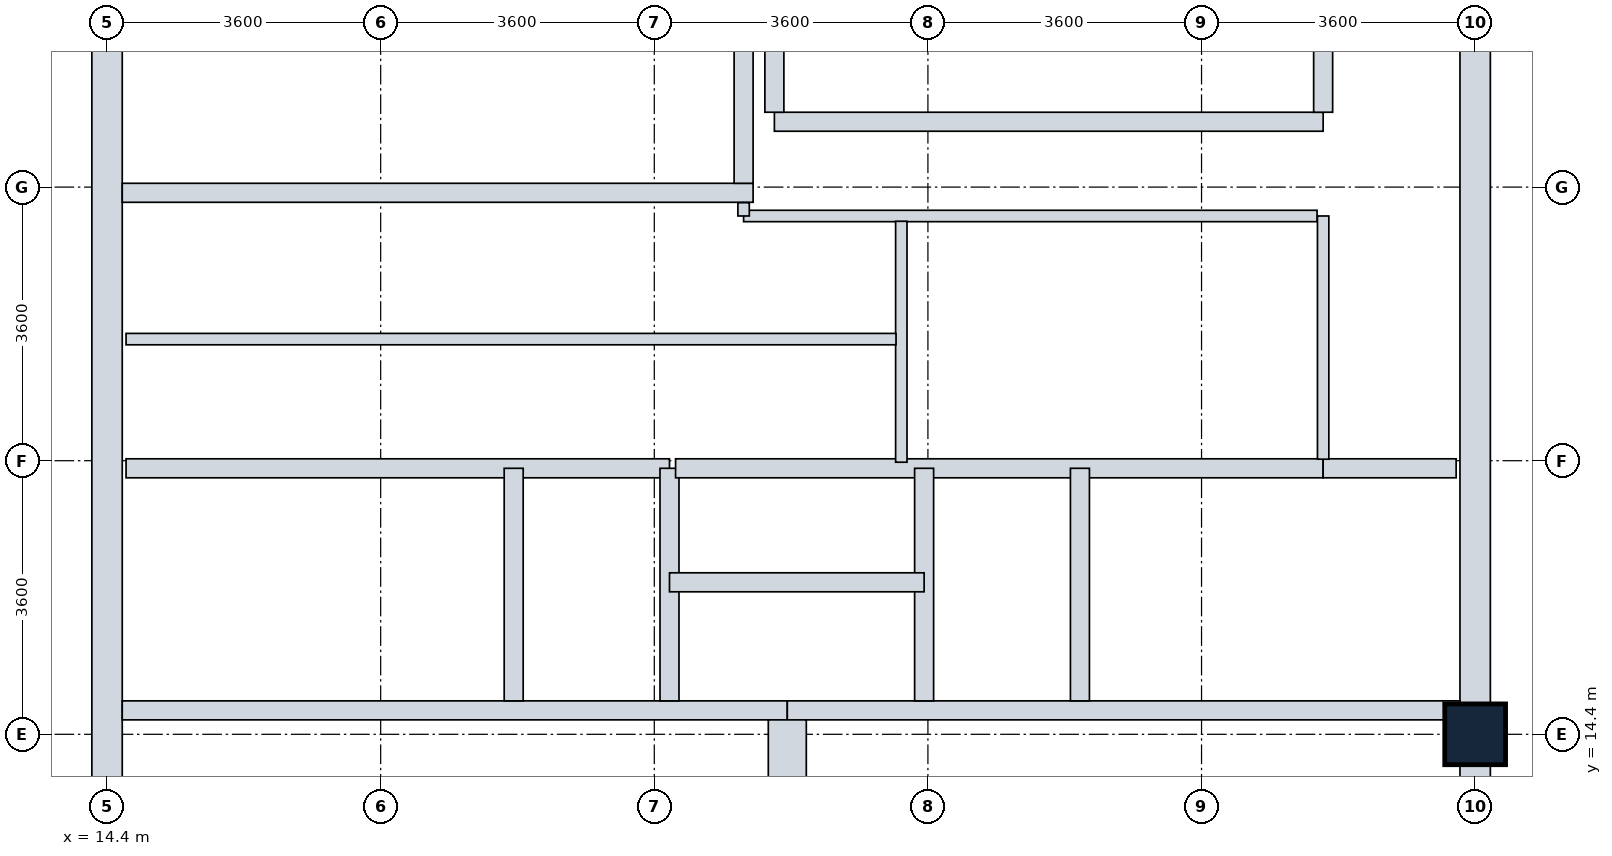
"""IFC4 building model, lengths in metres.
Left out: names, types, materials, properties, quantities, classifications, styles, units other than length and angle.
Written with IfcOpenShell. Run it as: python <this file> out.ifc"""

import sys

from ifc_helpers import new_model, si_unit, direction, frame, frame_2d, origin, origin_2d, place, context, subcontext, project, spatial, rectangle, extrude, element, fill, save


model = new_model("IFC4")
c1 = context("Model", 3, precision=1e-05, world=origin(), true_north=direction((0.0, 1.0)))
c2 = subcontext(c1, "Body", "Model", "MODEL_VIEW")
j1 = project(units=[si_unit("LENGTHUNIT", "METRE"), si_unit("PLANEANGLEUNIT", "RADIAN")], contexts=[c1])
p1 = place(None, origin())
s1 = spatial("IfcSite", under=j1, at=p1, CompositionType="ELEMENT")
p2 = place(p1, origin())
s2 = spatial("IfcBuilding", under=s1, at=p2, CompositionType="ELEMENT")
p3 = place(p2, frame((0.0, 0.0, 249.8)))
s3 = spatial("IfcBuildingStorey", under=s2, at=p3, CompositionType="ELEMENT", Elevation=249.8)
p4 = place(p3, frame((32.4, 14.4, 0.0), z_axis=(0.0, 0.0, 1.0), x_axis=(1.0, 0.0, 0.0)))
e1 = element("IfcColumn", 1, at=p4, inside=s3, PredefinedType="COLUMN", context=c2, shape_type="SweptSolid", body=[
    extrude(rectangle(XDim=0.8, YDim=0.8, at=origin_2d()), origin(), (0.0, 0.0, 1.0), 6.0),
])
p5 = place(p3, frame((14.4, 10.8, 0.0), z_axis=(0.0, 0.0, 1.0), x_axis=(0.0, 1.0, 0.0)))
e2 = element("IfcWall", 2, at=p5, inside=s3, PredefinedType="SHEAR", context=c2, shape_type="SweptSolid", body=[
    extrude(rectangle(XDim=14.4, YDim=0.4, at=frame_2d((7.2, 0.0))), origin(), (0.0, 0.0, 1.0), 5.75),
])
p6 = place(p5, frame((11.05, 0.0, 0.0)))
e3 = element("IfcOpeningElement", 3, at=p6, cuts=e2, PredefinedType="OPENING", context=c2, shape_type="SweptSolid", body=[
    extrude(rectangle(XDim=1.1, YDim=2.1, at=frame_2d((0.55, 1.05))), frame((0.0, 0.21, 0.0), z_axis=(0.0, -1.0, 0.0), x_axis=(1.0, 0.0, 0.0)), (0.0, 0.0, 1.0), 0.42),
])
p7 = place(p5, frame((4.9, 0.0, 0.0)))
e4 = element("IfcOpeningElement", 4, at=p7, cuts=e2, PredefinedType="OPENING", context=c2, shape_type="SweptSolid", body=[
    extrude(rectangle(XDim=1.2, YDim=2.1, at=frame_2d((0.6, 1.05))), frame((0.0, 0.21, 0.0), z_axis=(0.0, -1.0, 0.0), x_axis=(1.0, 0.0, 0.0)), (0.0, 0.0, 1.0), 0.42),
])
p8 = place(p5, frame((7.5, 0.0, 0.0)))
e5 = element("IfcOpeningElement", 5, at=p8, cuts=e2, PredefinedType="OPENING", context=c2, shape_type="SweptSolid", body=[
    extrude(rectangle(XDim=0.85, YDim=2.1, at=frame_2d((0.425, 1.05))), frame((0.0, 0.21, 0.0), z_axis=(0.0, -1.0, 0.0), x_axis=(1.0, 0.0, 0.0)), (0.0, 0.0, 1.0), 0.42),
])
p9 = place(p3, frame((32.4, 10.8, 0.0), z_axis=(0.0, 0.0, 1.0), x_axis=(0.0, 1.0, 0.0)))
e6 = element("IfcWall", 6, at=p9, inside=s3, PredefinedType="SHEAR", context=c2, shape_type="SweptSolid", body=[
    extrude(rectangle(XDim=14.4, YDim=0.4, at=frame_2d((7.2, 0.0))), origin(), (0.0, 0.0, 1.0), 5.75),
])
p10 = place(p9, frame((4.35, 0.0, 0.0)))
e7 = element("IfcOpeningElement", 7, at=p10, cuts=e6, PredefinedType="OPENING", context=c2, shape_type="SweptSolid", body=[
    extrude(rectangle(XDim=1.2, YDim=2.1, at=frame_2d((0.6, 1.05))), frame((0.0, 0.21, 0.0), z_axis=(0.0, -1.0, 0.0), x_axis=(1.0, 0.0, 0.0)), (0.0, 0.0, 1.0), 0.42),
])
p11 = place(p9, frame((10.0, 0.0, 0.0)))
e8 = element("IfcOpeningElement", 8, at=p11, cuts=e6, PredefinedType="OPENING", context=c2, shape_type="SweptSolid", body=[
    extrude(rectangle(XDim=1.2, YDim=2.1, at=frame_2d((0.6, 1.05))), frame((0.0, 0.21, 0.0), z_axis=(0.0, -1.0, 0.0), x_axis=(1.0, 0.0, 0.0)), (0.0, 0.0, 1.0), 0.42),
])
p12 = place(p3, frame((14.6, 14.715, 0.0), z_axis=(0.0, 0.0, 1.0), x_axis=(1.0, 0.0, 0.0)))
e9 = element("IfcWall", 9, at=p12, inside=s3, PredefinedType="SHEAR", context=c2, shape_type="SweptSolid", body=[
    extrude(rectangle(XDim=8.75, YDim=0.25, at=frame_2d((4.375, 0.0))), origin(), (0.0, 0.0, 1.0), 5.75),
])
p13 = place(p12, frame((0.755, 0.0, 0.0)))
e10 = element("IfcOpeningElement", 10, at=p13, cuts=e9, PredefinedType="OPENING", context=c2, shape_type="SweptSolid", body=[
    extrude(rectangle(XDim=1.1, YDim=2.1, at=frame_2d((0.55, 1.05))), frame((0.0, 0.135, 0.0), z_axis=(0.0, -1.0, 0.0), x_axis=(1.0, 0.0, 0.0)), (0.0, 0.0, 1.0), 0.27),
])
p14 = place(p3, frame((23.35, 14.715, 0.0), z_axis=(0.0, 0.0, 1.0), x_axis=(1.0, 0.0, 0.0)))
e11 = element("IfcWall", 11, at=p14, inside=s3, PredefinedType="SHEAR", context=c2, shape_type="SweptSolid", body=[
    extrude(rectangle(XDim=8.85, YDim=0.25, at=frame_2d((4.425, 0.0))), origin(), (0.0, 0.0, 1.0), 5.75),
])
p15 = place(p14, frame((6.775, 0.0, 0.0)))
e12 = element("IfcOpeningElement", 12, at=p15, cuts=e11, PredefinedType="OPENING", context=c2, shape_type="SweptSolid", body=[
    extrude(rectangle(XDim=1.1, YDim=2.1, at=frame_2d((0.55, 1.05))), frame((0.0, 0.135, 0.0), z_axis=(0.0, -1.0, 0.0), x_axis=(1.0, 0.0, 0.0)), (0.0, 0.0, 1.0), 0.27),
])
p16 = place(p3, frame((23.35, 11.75, 0.0), z_axis=(0.0, 0.0, 1.0), x_axis=(0.0, 1.0, 0.0)))
e13 = element("IfcWall", 13, at=p16, inside=s3, PredefinedType="SHEAR", context=c2, shape_type="SweptSolid", body=[
    extrude(rectangle(XDim=2.84, YDim=0.5, at=frame_2d((1.42, 0.0))), origin(), (0.0, 0.0, 1.0), 5.75),
])
p17 = place(p3, frame((14.6, 21.525, 0.0), z_axis=(0.0, 0.0, 1.0), x_axis=(1.0, 0.0, 0.0)))
e14 = element("IfcWall", 14, at=p17, inside=s3, PredefinedType="SHEAR", context=c2, shape_type="SweptSolid", body=[
    extrude(rectangle(XDim=8.3, YDim=0.25, at=frame_2d((4.15, 0.0))), origin(), (0.0, 0.0, 1.0), 5.75),
])
p18 = place(p3, frame((22.775, 21.65, 0.0), z_axis=(0.0, 0.0, 1.0), x_axis=(0.0, 1.0, 0.0)))
e15 = element("IfcWall", 15, at=p18, inside=s3, PredefinedType="SHEAR", context=c2, shape_type="SweptSolid", body=[
    extrude(rectangle(XDim=2.84, YDim=0.25, at=frame_2d((1.42, 0.0))), origin(), (0.0, 0.0, 1.0), 5.75),
])
p19 = place(p3, frame((14.65, 17.9, 0.0), z_axis=(0.0, 0.0, 1.0), x_axis=(1.0, 0.0, 0.0)))
e16 = element("IfcWall", 16, at=p19, inside=s3, PredefinedType="PARTITIONING", context=c2, shape_type="SweptSolid", body=[
    extrude(rectangle(XDim=7.15, YDim=0.25, at=frame_2d((3.575, 0.0))), origin(), (0.0, 0.0, 1.0), 5.735),
])
p20 = place(p3, frame((19.75, 14.84, 0.0), z_axis=(0.0, 0.0, 1.0), x_axis=(0.0, 1.0, 0.0)))
e17 = element("IfcWall", 17, at=p20, inside=s3, PredefinedType="PARTITIONING", context=c2, shape_type="SweptSolid", body=[
    extrude(rectangle(XDim=3.06, YDim=0.25, at=frame_2d((1.53, 0.0))), origin(), (0.0, 0.0, 1.0), 5.735),
])
p21 = place(p20, frame((0.98, 0.0, 0.0)))
e18 = element("IfcOpeningElement", 18, at=p21, cuts=e17, PredefinedType="OPENING", context=c2, shape_type="SweptSolid", body=[
    extrude(rectangle(XDim=1.1, YDim=2.1, at=frame_2d((0.55, 1.05))), frame((0.0, 0.135, 0.0), z_axis=(0.0, -1.0, 0.0), x_axis=(1.0, 0.0, 0.0)), (0.0, 0.0, 1.0), 0.27),
])
p22 = place(p3, frame((21.8, 14.84, 0.0), z_axis=(0.0, 0.0, 1.0), x_axis=(0.0, 1.0, 0.0)))
e19 = element("IfcWall", 19, at=p22, inside=s3, PredefinedType="PARTITIONING", context=c2, shape_type="SweptSolid", body=[
    extrude(rectangle(XDim=3.06, YDim=0.25, at=frame_2d((1.53, 0.0))), origin(), (0.0, 0.0, 1.0), 5.735),
])
p23 = place(p3, frame((21.88, 17.9, 0.0), z_axis=(0.0, 0.0, 1.0), x_axis=(1.0, 0.0, 0.0)))
e20 = element("IfcWall", 20, at=p23, inside=s3, PredefinedType="PARTITIONING", context=c2, shape_type="SweptSolid", body=[
    extrude(rectangle(XDim=8.52, YDim=0.25, at=frame_2d((4.26, 0.0))), origin(), (0.0, 0.0, 1.0), 5.735),
])
p24 = place(p3, frame((30.4, 17.9, 0.0), z_axis=(0.0, 0.0, 1.0), x_axis=(1.0, 0.0, 0.0)))
e21 = element("IfcWall", 21, at=p24, inside=s3, PredefinedType="PARTITIONING", context=c2, shape_type="SweptSolid", body=[
    extrude(rectangle(XDim=1.75, YDim=0.25, at=frame_2d((0.875, 0.0))), origin(), (0.0, 0.0, 1.0), 5.735),
])
p25 = place(p24, frame((0.32, 0.0, 0.0)))
e22 = element("IfcOpeningElement", 22, at=p25, cuts=e21, PredefinedType="OPENING", context=c2, shape_type="SweptSolid", body=[
    extrude(rectangle(XDim=1.1, YDim=2.1, at=frame_2d((0.55, 1.05))), frame((0.0, 0.135, 0.0), z_axis=(0.0, -1.0, 0.0), x_axis=(1.0, 0.0, 0.0)), (0.0, 0.0, 1.0), 0.27),
])
p26 = place(p3, frame((25.15, 14.84, 0.0), z_axis=(0.0, 0.0, 1.0), x_axis=(0.0, 1.0, 0.0)))
e23 = element("IfcWall", 23, at=p26, inside=s3, PredefinedType="PARTITIONING", context=c2, shape_type="SweptSolid", body=[
    extrude(rectangle(XDim=3.06, YDim=0.25, at=frame_2d((1.53, 0.0))), origin(), (0.0, 0.0, 1.0), 5.735),
])
p27 = place(p3, frame((27.2, 14.84, 0.0), z_axis=(0.0, 0.0, 1.0), x_axis=(0.0, 1.0, 0.0)))
e24 = element("IfcWall", 24, at=p27, inside=s3, PredefinedType="PARTITIONING", context=c2, shape_type="SweptSolid", body=[
    extrude(rectangle(XDim=3.06, YDim=0.25, at=frame_2d((1.53, 0.0))), origin(), (0.0, 0.0, 1.0), 5.735),
])
p28 = place(p27, frame((0.98, 0.0, 0.0)))
e25 = element("IfcOpeningElement", 25, at=p28, cuts=e24, PredefinedType="OPENING", context=c2, shape_type="SweptSolid", body=[
    extrude(rectangle(XDim=1.1, YDim=2.1, at=frame_2d((0.55, 1.05))), frame((0.0, 0.135, 0.0), z_axis=(0.0, -1.0, 0.0), x_axis=(1.0, 0.0, 0.0)), (0.0, 0.0, 1.0), 0.27),
])
p29 = place(p3, frame((21.8, 16.4, 0.0), z_axis=(0.0, 0.0, 1.0), x_axis=(1.0, 0.0, 0.0)))
e26 = element("IfcWall", 26, at=p29, inside=s3, PredefinedType="PARTITIONING", context=c2, shape_type="SweptSolid", body=[
    extrude(rectangle(XDim=3.35, YDim=0.25, at=frame_2d((1.675, 0.0))), origin(), (0.0, 0.0, 1.0), 5.735),
])
p30 = place(p3, frame((23.18, 22.46, 0.0), z_axis=(0.0, 0.0, 1.0), x_axis=(1.0, 0.0, 0.0)))
e27 = element("IfcWall", 27, at=p30, inside=s3, PredefinedType="PARTITIONING", context=c2, shape_type="SweptSolid", body=[
    extrude(rectangle(XDim=7.22, YDim=0.25, at=frame_2d((3.61, 0.0))), origin(), (0.0, 0.0, 1.0), 5.735),
])
p31 = place(p30, frame((0.41, 0.0, 0.0)))
e28 = element("IfcOpeningElement", 28, at=p31, cuts=e27, PredefinedType="OPENING", context=c2, shape_type="SweptSolid", body=[
    extrude(rectangle(XDim=1.1, YDim=2.1, at=frame_2d((0.55, 1.05))), frame((0.0, 0.135, 0.0), z_axis=(0.0, -1.0, 0.0), x_axis=(1.0, 0.0, 0.0)), (0.0, 0.0, 1.0), 0.27),
])
p32 = place(p30, frame((2.19, 0.0, 0.0)))
e29 = element("IfcOpeningElement", 29, at=p32, cuts=e27, PredefinedType="OPENING", context=c2, shape_type="SweptSolid", body=[
    extrude(rectangle(XDim=1.1, YDim=2.1, at=frame_2d((0.55, 1.05))), frame((0.0, 0.135, 0.0), z_axis=(0.0, -1.0, 0.0), x_axis=(1.0, 0.0, 0.0)), (0.0, 0.0, 1.0), 0.27),
])
p33 = place(p30, frame((3.97, 0.0, 0.0)))
e30 = element("IfcOpeningElement", 30, at=p33, cuts=e27, PredefinedType="OPENING", context=c2, shape_type="SweptSolid", body=[
    extrude(rectangle(XDim=1.1, YDim=2.1, at=frame_2d((0.55, 1.05))), frame((0.0, 0.135, 0.0), z_axis=(0.0, -1.0, 0.0), x_axis=(1.0, 0.0, 0.0)), (0.0, 0.0, 1.0), 0.27),
])
p34 = place(p30, frame((5.75, 0.0, 0.0)))
e31 = element("IfcOpeningElement", 31, at=p34, cuts=e27, PredefinedType="OPENING", context=c2, shape_type="SweptSolid", body=[
    extrude(rectangle(XDim=1.1, YDim=2.1, at=frame_2d((0.55, 1.05))), frame((0.0, 0.135, 0.0), z_axis=(0.0, -1.0, 0.0), x_axis=(1.0, 0.0, 0.0)), (0.0, 0.0, 1.0), 0.27),
])
for number, where, z_axis, x_axis in (
    (32, (23.18, 22.585, 0.0), (0.0, 0.0, 1.0), (0.0, 1.0, 0.0)),
    (33, (30.4, 22.585, 0.0), (0.0, 0.0, 1.0), (0.0, 1.0, 0.0)),
):
    element("IfcWall", number, at=place(p3, frame(where, z_axis=z_axis, x_axis=x_axis)), inside=s3, PredefinedType="PARTITIONING", context=c2, shape_type="SweptSolid", body=[
        extrude(rectangle(XDim=2.315, YDim=0.25, at=frame_2d((1.157, 0.0))), origin(), (0.0, 0.0, 1.0), 5.735),
    ])
p35 = place(p3, frame((22.775, 21.22, 0.0), z_axis=(0.0, 0.0, 1.0), x_axis=(1.0, 0.0, 0.0)))
e34 = element("IfcWall", 34, at=p35, inside=s3, PredefinedType="PARTITIONING", context=c2, shape_type="SweptSolid", body=[
    extrude(rectangle(XDim=7.545, YDim=0.15, at=frame_2d((3.772, 0.0))), origin(), (0.0, 0.0, 1.0), 5.735),
])
p36 = place(p35, frame((0.58, 0.0, 0.0)))
e35 = element("IfcOpeningElement", 35, at=p36, cuts=e34, PredefinedType="OPENING", context=c2, shape_type="SweptSolid", body=[
    extrude(rectangle(XDim=0.85, YDim=2.1, at=frame_2d((0.425, 1.05))), frame((0.0, 0.085, 0.0), z_axis=(0.0, -1.0, 0.0), x_axis=(1.0, 0.0, 0.0)), (0.0, 0.0, 1.0), 0.17),
])
p37 = place(p35, frame((4.2, 0.0, 0.0)))
e36 = element("IfcOpeningElement", 36, at=p37, cuts=e34, PredefinedType="OPENING", context=c2, shape_type="SweptSolid", body=[
    extrude(rectangle(XDim=0.9, YDim=2.1, at=frame_2d((0.45, 1.05))), frame((0.0, 0.085, 0.0), z_axis=(0.0, -1.0, 0.0), x_axis=(1.0, 0.0, 0.0)), (0.0, 0.0, 1.0), 0.17),
])
p38 = place(p3, frame((22.775, 21.22, 0.0), z_axis=(0.0, 0.0, 1.0), x_axis=(0.0, 1.0, 0.0)))
e37 = element("IfcWall", 37, at=p38, inside=s3, PredefinedType="PARTITIONING", context=c2, shape_type="SweptSolid", body=[
    extrude(rectangle(XDim=0.175, YDim=0.15, at=frame_2d((0.087, 0.0))), origin(), (0.0, 0.0, 1.0), 5.735),
])
p39 = place(p3, frame((30.4, 18.02, 0.0), z_axis=(0.0, 0.0, 1.0), x_axis=(0.0, 1.0, 0.0)))
e38 = element("IfcWall", 38, at=p39, inside=s3, PredefinedType="PARTITIONING", context=c2, shape_type="SweptSolid", body=[
    extrude(rectangle(XDim=3.2, YDim=0.15, at=frame_2d((1.6, 0.0))), origin(), (0.0, 0.0, 1.0), 5.735),
])
p40 = place(p3, frame((24.85, 17.98, 0.0), z_axis=(0.0, 0.0, 1.0), x_axis=(0.0, 1.0, 0.0)))
e39 = element("IfcWall", 39, at=p40, inside=s3, PredefinedType="PARTITIONING", context=c2, shape_type="SweptSolid", body=[
    extrude(rectangle(XDim=3.17, YDim=0.15, at=frame_2d((1.585, 0.0))), origin(), (0.0, 0.0, 1.0), 5.735),
])
p41 = place(p3, frame((14.65, 19.6, 0.0), z_axis=(0.0, 0.0, 1.0), x_axis=(1.0, 0.0, 0.0)))
e40 = element("IfcWall", 40, at=p41, inside=s3, PredefinedType="PARTITIONING", context=c2, shape_type="SweptSolid", body=[
    extrude(rectangle(XDim=10.13, YDim=0.15, at=frame_2d((5.065, 0.0))), origin(), (0.0, 0.0, 1.0), 5.735),
])
p42 = place(p13, origin())
e41 = element("IfcDoor", 41, at=p42, inside=s3, OperationType="SINGLE_SWING_LEFT", PredefinedType="DOOR", context=c2, shape_type="SweptSolid", body=[
    extrude(rectangle(XDim=1.1, YDim=2.1, at=frame_2d((0.55, 1.05))), frame((0.0, 0.025, 0.0), z_axis=(0.0, -1.0, 0.0), x_axis=(1.0, 0.0, 0.0)), (0.0, 0.0, 1.0), 0.05),
])
fill(e10, e41)
p43 = place(p15, origin())
e42 = element("IfcDoor", 42, at=p43, inside=s3, OperationType="SINGLE_SWING_LEFT", PredefinedType="DOOR", context=c2, shape_type="SweptSolid", body=[
    extrude(rectangle(XDim=1.1, YDim=2.1, at=frame_2d((0.55, 1.05))), frame((0.0, 0.025, 0.0), z_axis=(0.0, -1.0, 0.0), x_axis=(1.0, 0.0, 0.0)), (0.0, 0.0, 1.0), 0.05),
])
fill(e12, e42)
p44 = place(p6, origin())
e43 = element("IfcDoor", 43, at=p44, inside=s3, OperationType="SINGLE_SWING_RIGHT", PredefinedType="DOOR", context=c2, shape_type="SweptSolid", body=[
    extrude(rectangle(XDim=1.1, YDim=2.1, at=frame_2d((0.55, 1.05))), frame((0.0, 0.025, 0.0), z_axis=(0.0, -1.0, 0.0), x_axis=(1.0, 0.0, 0.0)), (0.0, 0.0, 1.0), 0.05),
])
fill(e3, e43)
p45 = place(p21, origin())
e44 = element("IfcDoor", 44, at=p45, inside=s3, OperationType="SLIDING_TO_LEFT", PredefinedType="DOOR", context=c2, shape_type="SweptSolid", body=[
    extrude(rectangle(XDim=1.1, YDim=2.1, at=frame_2d((0.55, 1.05))), frame((0.0, 0.025, 0.0), z_axis=(0.0, -1.0, 0.0), x_axis=(1.0, 0.0, 0.0)), (0.0, 0.0, 1.0), 0.05),
])
fill(e18, e44)
p46 = place(p28, origin())
e45 = element("IfcDoor", 45, at=p46, inside=s3, OperationType="SLIDING_TO_LEFT", PredefinedType="DOOR", context=c2, shape_type="SweptSolid", body=[
    extrude(rectangle(XDim=1.1, YDim=2.1, at=frame_2d((0.55, 1.05))), frame((0.0, 0.025, 0.0), z_axis=(0.0, -1.0, 0.0), x_axis=(1.0, 0.0, 0.0)), (0.0, 0.0, 1.0), 0.05),
])
fill(e25, e45)
p47 = place(p7, origin())
e46 = element("IfcDoor", 46, at=p47, inside=s3, OperationType="SINGLE_SWING_RIGHT", PredefinedType="DOOR", context=c2, shape_type="SweptSolid", body=[
    extrude(rectangle(XDim=1.2, YDim=2.1, at=frame_2d((0.6, 1.05))), frame((0.0, 0.025, 0.0), z_axis=(0.0, -1.0, 0.0), x_axis=(1.0, 0.0, 0.0)), (0.0, 0.0, 1.0), 0.05),
])
fill(e4, e46)
p48 = place(p10, origin())
e47 = element("IfcDoor", 47, at=p48, inside=s3, OperationType="SINGLE_SWING_LEFT", PredefinedType="DOOR", context=c2, shape_type="SweptSolid", body=[
    extrude(rectangle(XDim=1.2, YDim=2.1, at=frame_2d((0.6, 1.05))), frame((0.0, 0.025, 0.0), z_axis=(0.0, -1.0, 0.0), x_axis=(1.0, 0.0, 0.0)), (0.0, 0.0, 1.0), 0.05),
])
fill(e7, e47)
p49 = place(p25, origin())
e48 = element("IfcDoor", 48, at=p49, inside=s3, OperationType="SINGLE_SWING_LEFT", PredefinedType="DOOR", context=c2, shape_type="SweptSolid", body=[
    extrude(rectangle(XDim=1.1, YDim=2.1, at=frame_2d((0.55, 1.05))), frame((0.0, 0.025, 0.0), z_axis=(0.0, -1.0, 0.0), x_axis=(1.0, 0.0, 0.0)), (0.0, 0.0, 1.0), 0.05),
])
fill(e22, e48)
p50 = place(p31, origin())
e49 = element("IfcDoor", 49, at=p50, inside=s3, OperationType="SLIDING_TO_LEFT", PredefinedType="DOOR", context=c2, shape_type="SweptSolid", body=[
    extrude(rectangle(XDim=1.1, YDim=2.1, at=frame_2d((0.55, 1.05))), frame((0.0, 0.025, 0.0), z_axis=(0.0, -1.0, 0.0), x_axis=(1.0, 0.0, 0.0)), (0.0, 0.0, 1.0), 0.05),
])
fill(e28, e49)
p51 = place(p32, origin())
e50 = element("IfcDoor", 50, at=p51, inside=s3, OperationType="SLIDING_TO_LEFT", PredefinedType="DOOR", context=c2, shape_type="SweptSolid", body=[
    extrude(rectangle(XDim=1.1, YDim=2.1, at=frame_2d((0.55, 1.05))), frame((0.0, 0.025, 0.0), z_axis=(0.0, -1.0, 0.0), x_axis=(1.0, 0.0, 0.0)), (0.0, 0.0, 1.0), 0.05),
])
fill(e29, e50)
p52 = place(p33, origin())
e51 = element("IfcDoor", 51, at=p52, inside=s3, OperationType="SLIDING_TO_LEFT", PredefinedType="DOOR", context=c2, shape_type="SweptSolid", body=[
    extrude(rectangle(XDim=1.1, YDim=2.1, at=frame_2d((0.55, 1.05))), frame((0.0, 0.025, 0.0), z_axis=(0.0, -1.0, 0.0), x_axis=(1.0, 0.0, 0.0)), (0.0, 0.0, 1.0), 0.05),
])
fill(e30, e51)
p53 = place(p34, origin())
e52 = element("IfcDoor", 52, at=p53, inside=s3, OperationType="SLIDING_TO_LEFT", PredefinedType="DOOR", context=c2, shape_type="SweptSolid", body=[
    extrude(rectangle(XDim=1.1, YDim=2.1, at=frame_2d((0.55, 1.05))), frame((0.0, 0.025, 0.0), z_axis=(0.0, -1.0, 0.0), x_axis=(1.0, 0.0, 0.0)), (0.0, 0.0, 1.0), 0.05),
])
fill(e31, e52)
p54 = place(p11, origin())
e53 = element("IfcDoor", 53, at=p54, inside=s3, OperationType="SINGLE_SWING_RIGHT", PredefinedType="DOOR", context=c2, shape_type="SweptSolid", body=[
    extrude(rectangle(XDim=1.2, YDim=2.1, at=frame_2d((0.6, 1.05))), frame((0.0, 0.025, 0.0), z_axis=(0.0, -1.0, 0.0), x_axis=(1.0, 0.0, 0.0)), (0.0, 0.0, 1.0), 0.05),
])
fill(e8, e53)
p55 = place(p8, origin())
e54 = element("IfcDoor", 54, at=p55, inside=s3, OperationType="SINGLE_SWING_RIGHT", PredefinedType="DOOR", context=c2, shape_type="SweptSolid", body=[
    extrude(rectangle(XDim=0.85, YDim=2.1, at=frame_2d((0.425, 1.05))), frame((0.0, 0.025, 0.0), z_axis=(0.0, -1.0, 0.0), x_axis=(1.0, 0.0, 0.0)), (0.0, 0.0, 1.0), 0.05),
])
fill(e5, e54)
p56 = place(p36, origin())
e55 = element("IfcDoor", 55, at=p56, inside=s3, OperationType="SINGLE_SWING_LEFT", PredefinedType="DOOR", context=c2, shape_type="SweptSolid", body=[
    extrude(rectangle(XDim=0.85, YDim=2.1, at=frame_2d((0.425, 1.05))), frame((0.0, 0.025, 0.0), z_axis=(0.0, -1.0, 0.0), x_axis=(1.0, 0.0, 0.0)), (0.0, 0.0, 1.0), 0.05),
])
fill(e35, e55)
p57 = place(p37, origin())
e56 = element("IfcDoor", 56, at=p57, inside=s3, OperationType="SINGLE_SWING_RIGHT", PredefinedType="DOOR", context=c2, shape_type="SweptSolid", body=[
    extrude(rectangle(XDim=0.9, YDim=2.1, at=frame_2d((0.45, 1.05))), frame((0.0, 0.025, 0.0), z_axis=(0.0, -1.0, 0.0), x_axis=(1.0, 0.0, 0.0)), (0.0, 0.0, 1.0), 0.05),
])
fill(e36, e56)
save(model, sys.argv[1])
